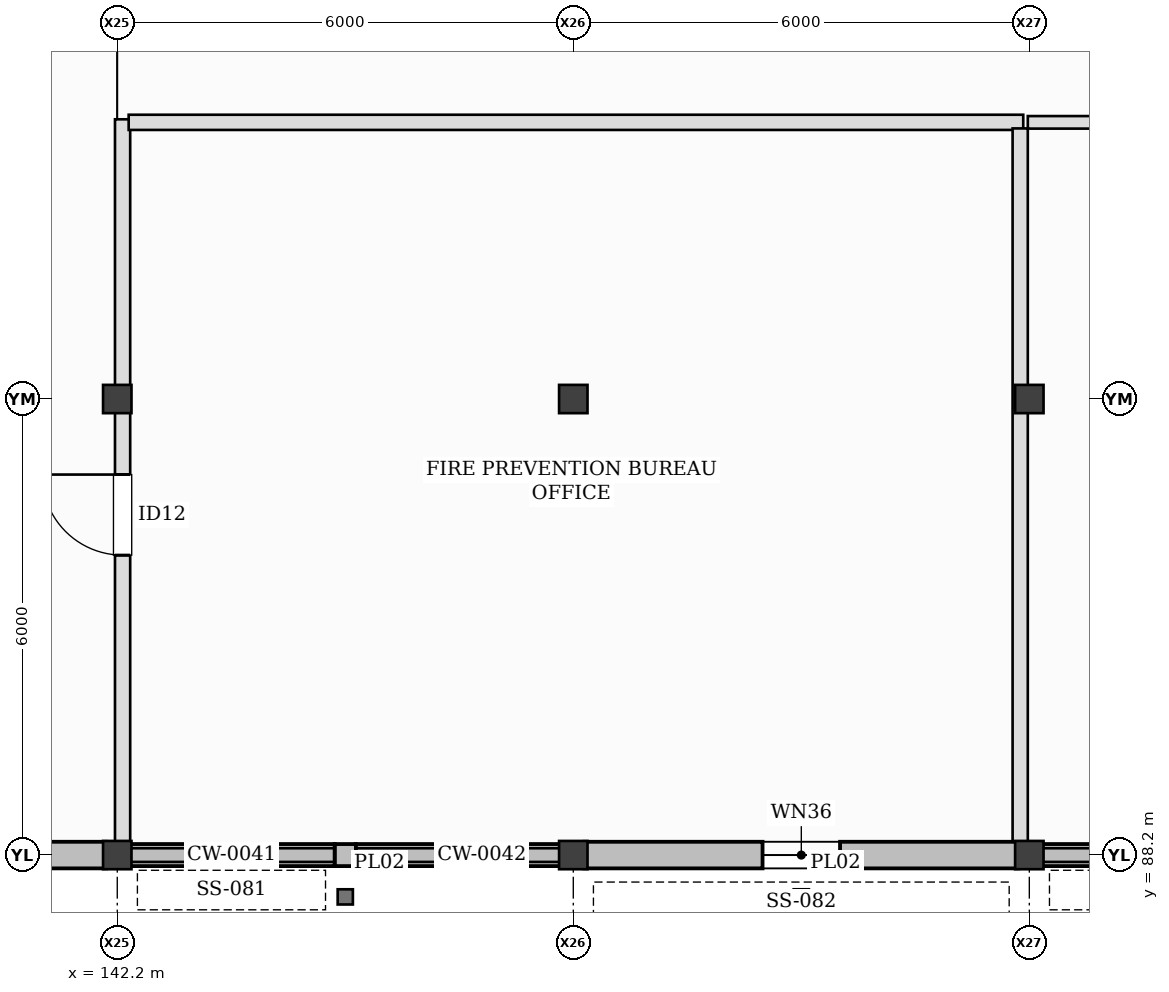
"""IFC4 building model, lengths in metres.
Left out: names, types, materials, properties, quantities, classifications, styles, units other than length and angle.
Written with IfcOpenShell. Run it as: python <this file> out.ifc"""

import sys

from ifc_helpers import new_model, si_unit, direction, frame, frame_2d, origin, origin_2d, place, context, subcontext, project, spatial, rectangle, hollow_rectangle, i_section, extrude, element, fill, save


model = new_model("IFC4")
c1 = context("Model", 3, precision=1e-05, world=origin(), true_north=direction((0.0, 1.0)))
c2 = subcontext(c1, "Body", "Model", "MODEL_VIEW")
j1 = project(units=[si_unit("LENGTHUNIT", "METRE"), si_unit("PLANEANGLEUNIT", "RADIAN")], contexts=[c1])
p1 = place(None, origin())
s1 = spatial("IfcSite", under=j1, at=p1, CompositionType="ELEMENT")
p2 = place(p1, origin())
s2 = spatial("IfcBuilding", under=s1, at=p2, CompositionType="ELEMENT")
p3 = place(p2, origin())
s3 = spatial("IfcBuildingStorey", under=s2, at=p3, CompositionType="ELEMENT", Elevation=0.0)
for number, where, z_axis, x_axis in (
    (1, (142.2, 88.2, 0.0), (0.0, 0.0, 1.0), (1.0, 0.0, 0.0)),
    (2, (142.2, 94.2, 0.0), (0.0, 0.0, 1.0), (1.0, 0.0, 0.0)),
    (3, (148.2, 88.2, 0.0), (0.0, 0.0, 1.0), (1.0, 0.0, 0.0)),
    (4, (148.2, 94.2, 0.0), (0.0, 0.0, 1.0), (1.0, 0.0, 0.0)),
    (5, (154.2, 88.2, 0.0), (0.0, 0.0, 1.0), (1.0, 0.0, 0.0)),
    (6, (154.2, 94.2, 0.0), (0.0, 0.0, 1.0), (1.0, 0.0, 0.0)),
):
    element("IfcColumn", number, at=place(p3, frame(where, z_axis=z_axis, x_axis=x_axis)), inside=s3, PredefinedType="COLUMN", context=c2, shape_type="SweptSolid", body=[
        extrude(i_section(OverallWidth=0.374, OverallDepth=0.372, WebThickness=0.016, FlangeThickness=0.026, at=origin_2d()), origin(), (0.0, 0.0, 1.0), 6.0),
    ])
for number, where, z_axis, x_axis in (
    (7, (145.2, 87.65, -0.35), (0.0, 0.0, 1.0), (1.0, 0.0, 0.0)),
    (8, (151.2, 87.65, -0.35), (0.0, 0.0, 1.0), (1.0, 0.0, 0.0)),
):
    element("IfcColumn", number, at=place(p3, frame(where, z_axis=z_axis, x_axis=x_axis)), inside=s3, PredefinedType="PILASTER", context=c2, shape_type="SweptSolid", body=[
        extrude(hollow_rectangle(XDim=0.2, YDim=0.2, WallThickness=0.01, at=origin_2d()), origin(), (0.0, 0.0, 1.0), 6.35),
    ])
p4 = place(p3, frame((136.345, 88.2, 0.0), z_axis=(0.0, 0.0, 1.0), x_axis=(1.0, 0.0, 0.0)))
e9 = element("IfcWall", 9, at=p4, inside=s3, PredefinedType="STANDARD", context=c2, shape_type="SweptSolid", body=[
    extrude(rectangle(XDim=5.71, YDim=0.35, at=frame_2d((2.855, 0.0))), origin(), (0.0, 0.0, 1.0), 5.113),
])
p5 = place(p4, frame((1.68, 0.0, 0.0)))
e10 = element("IfcOpeningElement", 10, at=p5, cuts=e9, PredefinedType="OPENING", context=c2, shape_type="SweptSolid", body=[
    extrude(rectangle(XDim=1.95, YDim=2.35, at=frame_2d((0.975, 1.175))), frame((0.0, 0.185, 0.0), z_axis=(0.0, -1.0, 0.0), x_axis=(1.0, 0.0, 0.0)), (0.0, 0.0, 1.0), 0.37),
])
p6 = place(p3, frame((145.06, 88.2, 0.0), z_axis=(0.0, 0.0, 1.0), x_axis=(1.0, 0.0, 0.0)))
e11 = element("IfcWall", 11, at=p6, inside=s3, PredefinedType="STANDARD", context=c2, shape_type="SweptSolid", body=[
    extrude(rectangle(XDim=0.28, YDim=0.29, at=frame_2d((0.14, 0.0))), origin(), (0.0, 0.0, 1.0), 5.113),
])
p7 = place(p3, frame((142.345, 88.2, 0.0), z_axis=(0.0, 0.0, 1.0), x_axis=(1.0, 0.0, 0.0)))
e12 = element("IfcWall", 12, at=p7, inside=s3, PredefinedType="STANDARD", context=c2, shape_type="SweptSolid", body=[
    extrude(rectangle(XDim=2.715, YDim=0.29, at=frame_2d((1.357, 0.0))), origin(), (0.0, 0.0, 1.0), 0.32),
])
p8 = place(p3, frame((145.34, 88.2, 0.0), z_axis=(0.0, 0.0, 1.0), x_axis=(1.0, 0.0, 0.0)))
e13 = element("IfcWall", 13, at=p8, inside=s3, PredefinedType="STANDARD", context=c2, shape_type="SweptSolid", body=[
    extrude(rectangle(XDim=2.715, YDim=0.29, at=frame_2d((1.357, 0.0))), origin(), (0.0, 0.0, 1.0), 0.44),
])
p9 = place(p3, frame((148.345, 88.2, 0.0), z_axis=(0.0, 0.0, 1.0), x_axis=(1.0, 0.0, 0.0)))
e14 = element("IfcWall", 14, at=p9, inside=s3, PredefinedType="STANDARD", context=c2, shape_type="SweptSolid", body=[
    extrude(rectangle(XDim=5.71, YDim=0.35, at=frame_2d((2.855, 0.0))), origin(), (0.0, 0.0, 1.0), 5.113),
])
p10 = place(p9, frame((2.345, 0.0, 0.85)))
e15 = element("IfcOpeningElement", 15, at=p10, cuts=e14, PredefinedType="OPENING", context=c2, shape_type="SweptSolid", body=[
    extrude(rectangle(XDim=1.02, YDim=2.05, at=frame_2d((0.51, 1.025))), frame((0.0, 0.185, 0.0), z_axis=(0.0, -1.0, 0.0), x_axis=(1.0, 0.0, 0.0)), (0.0, 0.0, 1.0), 0.37),
])
p11 = place(p3, frame((154.345, 88.2, 0.0), z_axis=(0.0, 0.0, 1.0), x_axis=(1.0, 0.0, 0.0)))
e16 = element("IfcWall", 16, at=p11, inside=s3, PredefinedType="STANDARD", context=c2, shape_type="SweptSolid", body=[
    extrude(rectangle(XDim=2.715, YDim=0.29, at=frame_2d((1.357, 0.0))), origin(), (0.0, 0.0, 1.0), 0.56),
])
p12 = place(p3, frame((142.27, 88.375, 0.0), z_axis=(0.0, 0.0, 1.0), x_axis=(0.0, 1.0, 0.0)))
e17 = element("IfcWall", 17, at=p12, inside=s3, PredefinedType="PARTITIONING", context=c2, shape_type="SweptSolid", body=[
    extrude(rectangle(XDim=9.505, YDim=0.2, at=frame_2d((4.752, 0.0))), origin(), (0.0, 0.0, 1.0), 5.044),
])
p13 = place(p12, frame((3.771, 0.0, 0.0)))
e18 = element("IfcOpeningElement", 18, at=p13, cuts=e17, PredefinedType="OPENING", context=c2, shape_type="SweptSolid", body=[
    extrude(rectangle(XDim=1.06, YDim=2.25, at=frame_2d((0.53, 1.125))), frame((0.0, 0.11, 0.0), z_axis=(0.0, -1.0, 0.0), x_axis=(1.0, 0.0, 0.0)), (0.0, 0.0, 1.0), 0.22),
])
p14 = place(p3, frame((142.35, 97.84, 0.0), z_axis=(0.0, 0.0, 1.0), x_axis=(1.0, 0.0, 0.0)))
e19 = element("IfcWall", 19, at=p14, inside=s3, PredefinedType="PARTITIONING", context=c2, shape_type="SweptSolid", body=[
    extrude(rectangle(XDim=11.77, YDim=0.2, at=frame_2d((5.885, 0.0))), origin(), (0.0, 0.0, 1.0), 5.68),
])
p15 = place(p3, frame((154.08, 97.76, 0.0), z_axis=(0.0, 0.0, 1.0), x_axis=(0.0, -1.0, 0.0)))
e20 = element("IfcWall", 20, at=p15, inside=s3, PredefinedType="PARTITIONING", context=c2, shape_type="SweptSolid", body=[
    extrude(rectangle(XDim=9.385, YDim=0.2, at=frame_2d((4.692, 0.0))), origin(), (0.0, 0.0, 1.0), 5.044),
])
p16 = place(p3, frame((154.18, 97.84, 0.0), z_axis=(0.0, 0.0, 1.0), x_axis=(1.0, 0.0, 0.0)))
e21 = element("IfcWall", 21, at=p16, inside=s3, PredefinedType="PARTITIONING", context=c2, shape_type="SweptSolid", body=[
    extrude(rectangle(XDim=11.845, YDim=0.165, at=frame_2d((5.922, 0.0))), origin(), (0.0, 0.0, 1.0), 5.68),
])
p17 = place(p16, frame((5.042, 0.0, 0.0)))
e22 = element("IfcOpeningElement", 22, at=p17, cuts=e21, PredefinedType="OPENING", context=c2, shape_type="SweptSolid", body=[
    extrude(rectangle(XDim=1.76, YDim=2.26, at=frame_2d((0.88, 1.13))), frame((0.0, 0.093, 0.0), z_axis=(0.0, -1.0, 0.0), x_axis=(1.0, 0.0, 0.0)), (0.0, 0.0, 1.0), 0.185),
])
p18 = place(p10, origin())
e23 = element("IfcWindow", 23, at=p18, inside=s3, PartitioningType="SINGLE_PANEL", PredefinedType="WINDOW", context=c2, shape_type="SweptSolid", body=[
    extrude(rectangle(XDim=1.02, YDim=2.05, at=frame_2d((0.51, 1.025))), frame((0.0, 0.03, 0.0), z_axis=(0.0, -1.0, 0.0), x_axis=(1.0, 0.0, 0.0)), (0.0, 0.0, 1.0), 0.06),
])
fill(e15, e23)
p19 = place(p13, frame((1.06, 0.0, 0.0), z_axis=(0.0, 0.0, 1.0), x_axis=(-1.0, 0.0, 0.0)))
e24 = element("IfcDoor", 24, at=p19, inside=s3, OperationType="SINGLE_SWING_RIGHT", PredefinedType="DOOR", context=c2, shape_type="SweptSolid", body=[
    extrude(rectangle(XDim=1.06, YDim=2.25, at=frame_2d((0.53, 1.125))), frame((0.0, 0.025, 0.0), z_axis=(0.0, -1.0, 0.0), x_axis=(1.0, 0.0, 0.0)), (0.0, 0.0, 1.0), 0.05),
])
fill(e18, e24)
save(model, sys.argv[1])
